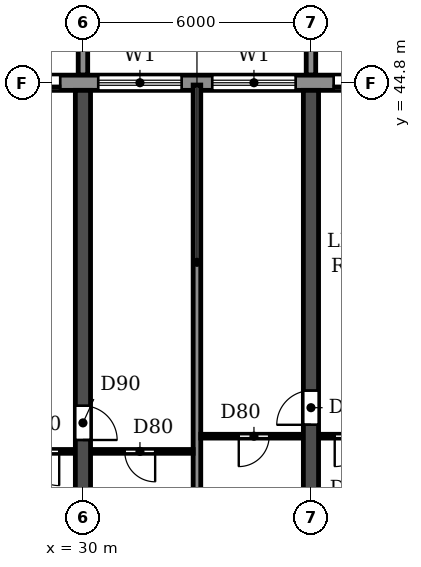
"""IFC4 building model, lengths in metres.
Left out: names, types, materials, properties, quantities, classifications, styles, units other than length and angle.
Written with IfcOpenShell. Run it as: python <this file> out.ifc"""

import sys

from ifc_helpers import new_model, si_unit, direction, frame, frame_2d, origin, place, context, subcontext, project, spatial, polyline, rectangle, outline, extrude, source, transform, mapped, element, fill, save


model = new_model("IFC4")
c1 = context("Model", 3, precision=1e-05, world=origin(), true_north=direction((0.0, 1.0)))
c2 = subcontext(c1, "Body", "Model", "MODEL_VIEW")
j1 = project(units=[si_unit("LENGTHUNIT", "METRE"), si_unit("PLANEANGLEUNIT", "RADIAN")], contexts=[c1])
p1 = place(None, origin())
s1 = spatial("IfcSite", under=j1, at=p1, CompositionType="ELEMENT")
p2 = place(p1, origin())
s2 = spatial("IfcBuilding", under=s1, at=p2, CompositionType="ELEMENT")
p3 = place(p2, frame((0.0, 0.0, 63.0)))
s3 = spatial("IfcBuildingStorey", under=s2, at=p3, CompositionType="ELEMENT", Elevation=63.0)
p4 = place(p3, frame((30.0, 30.55, 0.0), z_axis=(0.0, 0.0, 1.0), x_axis=(0.0, 1.0, 0.0)))
e1 = element("IfcWall", 1, at=p4, inside=s3, PredefinedType="SHEAR", context=c2, shape_type="SweptSolid", body=[
    extrude(rectangle(XDim=14.05, YDim=0.4, at=frame_2d((7.025, 0.0))), origin(), (0.0, 0.0, 1.0), 2.95),
])
p5 = place(p4, frame((4.85, 0.0, 0.0)))
e2 = element("IfcOpeningElement", 2, at=p5, cuts=e1, PredefinedType="OPENING", context=c2, shape_type="SweptSolid", body=[
    extrude(rectangle(XDim=0.9, YDim=2.1, at=frame_2d((0.45, 1.05))), frame((0.0, 0.21, 0.0), z_axis=(0.0, -1.0, 0.0), x_axis=(1.0, 0.0, 0.0)), (0.0, 0.0, 1.0), 0.42),
])
p6 = place(p3, frame((36.0, 30.55, 0.0), z_axis=(0.0, 0.0, 1.0), x_axis=(0.0, 1.0, 0.0)))
e3 = element("IfcWall", 3, at=p6, inside=s3, PredefinedType="SHEAR", context=c2, shape_type="SweptSolid", body=[
    extrude(rectangle(XDim=14.05, YDim=0.4, at=frame_2d((7.025, 0.0))), origin(), (0.0, 0.0, 1.0), 2.95),
])
p7 = place(p6, frame((5.25, 0.0, 0.0)))
e4 = element("IfcOpeningElement", 4, at=p7, cuts=e3, PredefinedType="OPENING", context=c2, shape_type="SweptSolid", body=[
    extrude(rectangle(XDim=0.9, YDim=2.1, at=frame_2d((0.45, 1.05))), frame((0.0, 0.21, 0.0), z_axis=(0.0, -1.0, 0.0), x_axis=(1.0, 0.0, 0.0)), (0.0, 0.0, 1.0), 0.42),
])
p8 = place(p3, frame((91.317, 44.8, 0.0), z_axis=(0.0, 0.0, 1.0), x_axis=(-1.0, 0.0, 0.0)))
e5 = element("IfcWall", 5, at=p8, inside=s3, PredefinedType="STANDARD", context=c2, shape_type="SweptSolid", body=[
    extrude(rectangle(XDim=80.634, YDim=0.4, at=frame_2d((40.317, 0.0))), origin(), (0.0, 0.0, 1.0), 2.95),
])
p9 = place(p8, frame((76.717, 0.0, 0.9)))
e6 = element("IfcOpeningElement", 6, at=p9, cuts=e5, PredefinedType="OPENING", context=c2, shape_type="SweptSolid", body=[
    extrude(rectangle(XDim=2.2, YDim=1.5, at=frame_2d((1.1, 0.75))), frame((0.0, 0.21, 0.0), z_axis=(0.0, -1.0, 0.0), x_axis=(1.0, 0.0, 0.0)), (0.0, 0.0, 1.0), 0.42),
])
p10 = place(p8, frame((73.917, 0.0, 0.0)))
e7 = element("IfcOpeningElement", 7, at=p10, cuts=e5, PredefinedType="OPENING", context=c2, shape_type="SweptSolid", body=[
    extrude(rectangle(XDim=1.8, YDim=2.4, at=frame_2d((0.9, 1.2))), frame((0.0, 0.21, 0.0), z_axis=(0.0, -1.0, 0.0), x_axis=(1.0, 0.0, 0.0)), (0.0, 0.0, 1.0), 0.42),
])
p11 = place(p8, frame((70.717, 0.0, 0.9)))
e8 = element("IfcOpeningElement", 8, at=p11, cuts=e5, PredefinedType="OPENING", context=c2, shape_type="SweptSolid", body=[
    extrude(rectangle(XDim=2.2, YDim=1.5, at=frame_2d((1.1, 0.75))), frame((0.0, 0.21, 0.0), z_axis=(0.0, -1.0, 0.0), x_axis=(1.0, 0.0, 0.0)), (0.0, 0.0, 1.0), 0.42),
])
p12 = place(p8, frame((67.917, 0.0, 0.0)))
e9 = element("IfcOpeningElement", 9, at=p12, cuts=e5, PredefinedType="OPENING", context=c2, shape_type="SweptSolid", body=[
    extrude(rectangle(XDim=1.8, YDim=2.4, at=frame_2d((0.9, 1.2))), frame((0.0, 0.21, 0.0), z_axis=(0.0, -1.0, 0.0), x_axis=(1.0, 0.0, 0.0)), (0.0, 0.0, 1.0), 0.42),
])
p13 = place(p8, frame((64.717, 0.0, 0.9)))
e10 = element("IfcOpeningElement", 10, at=p13, cuts=e5, PredefinedType="OPENING", context=c2, shape_type="SweptSolid", body=[
    extrude(rectangle(XDim=2.2, YDim=1.5, at=frame_2d((1.1, 0.75))), frame((0.0, 0.21, 0.0), z_axis=(0.0, -1.0, 0.0), x_axis=(1.0, 0.0, 0.0)), (0.0, 0.0, 1.0), 0.42),
])
p14 = place(p8, frame((61.917, 0.0, 0.0)))
e11 = element("IfcOpeningElement", 11, at=p14, cuts=e5, PredefinedType="OPENING", context=c2, shape_type="SweptSolid", body=[
    extrude(rectangle(XDim=1.8, YDim=2.4, at=frame_2d((0.9, 1.2))), frame((0.0, 0.21, 0.0), z_axis=(0.0, -1.0, 0.0), x_axis=(1.0, 0.0, 0.0)), (0.0, 0.0, 1.0), 0.42),
])
p15 = place(p8, frame((58.717, 0.0, 0.9)))
e12 = element("IfcOpeningElement", 12, at=p15, cuts=e5, PredefinedType="OPENING", context=c2, shape_type="SweptSolid", body=[
    extrude(rectangle(XDim=2.2, YDim=1.5, at=frame_2d((1.1, 0.75))), frame((0.0, 0.21, 0.0), z_axis=(0.0, -1.0, 0.0), x_axis=(1.0, 0.0, 0.0)), (0.0, 0.0, 1.0), 0.42),
])
p16 = place(p8, frame((55.717, 0.0, 0.9)))
e13 = element("IfcOpeningElement", 13, at=p16, cuts=e5, PredefinedType="OPENING", context=c2, shape_type="SweptSolid", body=[
    extrude(rectangle(XDim=2.2, YDim=1.5, at=frame_2d((1.1, 0.75))), frame((0.0, 0.21, 0.0), z_axis=(0.0, -1.0, 0.0), x_axis=(1.0, 0.0, 0.0)), (0.0, 0.0, 1.0), 0.42),
])
p17 = place(p8, frame((52.917, 0.0, 0.0)))
e14 = element("IfcOpeningElement", 14, at=p17, cuts=e5, PredefinedType="OPENING", context=c2, shape_type="SweptSolid", body=[
    extrude(rectangle(XDim=1.8, YDim=2.4, at=frame_2d((0.9, 1.2))), frame((0.0, 0.21, 0.0), z_axis=(0.0, -1.0, 0.0), x_axis=(1.0, 0.0, 0.0)), (0.0, 0.0, 1.0), 0.42),
])
p18 = place(p8, frame((49.717, 0.0, 0.9)))
e15 = element("IfcOpeningElement", 15, at=p18, cuts=e5, PredefinedType="OPENING", context=c2, shape_type="SweptSolid", body=[
    extrude(rectangle(XDim=2.2, YDim=1.5, at=frame_2d((1.1, 0.75))), frame((0.0, 0.21, 0.0), z_axis=(0.0, -1.0, 0.0), x_axis=(1.0, 0.0, 0.0)), (0.0, 0.0, 1.0), 0.42),
])
p19 = place(p8, frame((46.917, 0.0, 0.0)))
e16 = element("IfcOpeningElement", 16, at=p19, cuts=e5, PredefinedType="OPENING", context=c2, shape_type="SweptSolid", body=[
    extrude(rectangle(XDim=1.8, YDim=2.4, at=frame_2d((0.9, 1.2))), frame((0.0, 0.21, 0.0), z_axis=(0.0, -1.0, 0.0), x_axis=(1.0, 0.0, 0.0)), (0.0, 0.0, 1.0), 0.42),
])
p20 = place(p8, frame((43.717, 0.0, 0.9)))
e17 = element("IfcOpeningElement", 17, at=p20, cuts=e5, PredefinedType="OPENING", context=c2, shape_type="SweptSolid", body=[
    extrude(rectangle(XDim=2.2, YDim=1.5, at=frame_2d((1.1, 0.75))), frame((0.0, 0.21, 0.0), z_axis=(0.0, -1.0, 0.0), x_axis=(1.0, 0.0, 0.0)), (0.0, 0.0, 1.0), 0.42),
])
p21 = place(p8, frame((40.717, 0.0, 0.9)))
e18 = element("IfcOpeningElement", 18, at=p21, cuts=e5, PredefinedType="OPENING", context=c2, shape_type="SweptSolid", body=[
    extrude(rectangle(XDim=2.2, YDim=1.5, at=frame_2d((1.1, 0.75))), frame((0.0, 0.21, 0.0), z_axis=(0.0, -1.0, 0.0), x_axis=(1.0, 0.0, 0.0)), (0.0, 0.0, 1.0), 0.42),
])
p22 = place(p8, frame((37.717, 0.0, 0.9)))
e19 = element("IfcOpeningElement", 19, at=p22, cuts=e5, PredefinedType="OPENING", context=c2, shape_type="SweptSolid", body=[
    extrude(rectangle(XDim=2.2, YDim=1.5, at=frame_2d((1.1, 0.75))), frame((0.0, 0.21, 0.0), z_axis=(0.0, -1.0, 0.0), x_axis=(1.0, 0.0, 0.0)), (0.0, 0.0, 1.0), 0.42),
])
p23 = place(p8, frame((34.717, 0.0, 0.9)))
e20 = element("IfcOpeningElement", 20, at=p23, cuts=e5, PredefinedType="OPENING", context=c2, shape_type="SweptSolid", body=[
    extrude(rectangle(XDim=2.2, YDim=1.5, at=frame_2d((1.1, 0.75))), frame((0.0, 0.21, 0.0), z_axis=(0.0, -1.0, 0.0), x_axis=(1.0, 0.0, 0.0)), (0.0, 0.0, 1.0), 0.42),
])
p24 = place(p8, frame((31.917, 0.0, 0.0)))
e21 = element("IfcOpeningElement", 21, at=p24, cuts=e5, PredefinedType="OPENING", context=c2, shape_type="SweptSolid", body=[
    extrude(rectangle(XDim=1.8, YDim=2.4, at=frame_2d((0.9, 1.2))), frame((0.0, 0.21, 0.0), z_axis=(0.0, -1.0, 0.0), x_axis=(1.0, 0.0, 0.0)), (0.0, 0.0, 1.0), 0.42),
])
p25 = place(p8, frame((28.917, 0.0, 0.0)))
e22 = element("IfcOpeningElement", 22, at=p25, cuts=e5, PredefinedType="OPENING", context=c2, shape_type="SweptSolid", body=[
    extrude(rectangle(XDim=1.8, YDim=2.4, at=frame_2d((0.9, 1.2))), frame((0.0, 0.21, 0.0), z_axis=(0.0, -1.0, 0.0), x_axis=(1.0, 0.0, 0.0)), (0.0, 0.0, 1.0), 0.42),
])
p26 = place(p8, frame((25.717, 0.0, 0.9)))
e23 = element("IfcOpeningElement", 23, at=p26, cuts=e5, PredefinedType="OPENING", context=c2, shape_type="SweptSolid", body=[
    extrude(rectangle(XDim=2.2, YDim=1.5, at=frame_2d((1.1, 0.75))), frame((0.0, 0.21, 0.0), z_axis=(0.0, -1.0, 0.0), x_axis=(1.0, 0.0, 0.0)), (0.0, 0.0, 1.0), 0.42),
])
p27 = place(p8, frame((22.917, 0.0, 0.0)))
e24 = element("IfcOpeningElement", 24, at=p27, cuts=e5, PredefinedType="OPENING", context=c2, shape_type="SweptSolid", body=[
    extrude(rectangle(XDim=1.8, YDim=2.4, at=frame_2d((0.9, 1.2))), frame((0.0, 0.21, 0.0), z_axis=(0.0, -1.0, 0.0), x_axis=(1.0, 0.0, 0.0)), (0.0, 0.0, 1.0), 0.42),
])
p28 = place(p8, frame((19.717, 0.0, 0.9)))
e25 = element("IfcOpeningElement", 25, at=p28, cuts=e5, PredefinedType="OPENING", context=c2, shape_type="SweptSolid", body=[
    extrude(rectangle(XDim=2.2, YDim=1.5, at=frame_2d((1.1, 0.75))), frame((0.0, 0.21, 0.0), z_axis=(0.0, -1.0, 0.0), x_axis=(1.0, 0.0, 0.0)), (0.0, 0.0, 1.0), 0.42),
])
p29 = place(p8, frame((16.917, 0.0, 0.0)))
e26 = element("IfcOpeningElement", 26, at=p29, cuts=e5, PredefinedType="OPENING", context=c2, shape_type="SweptSolid", body=[
    extrude(rectangle(XDim=1.8, YDim=2.4, at=frame_2d((0.9, 1.2))), frame((0.0, 0.21, 0.0), z_axis=(0.0, -1.0, 0.0), x_axis=(1.0, 0.0, 0.0)), (0.0, 0.0, 1.0), 0.42),
])
p30 = place(p8, frame((13.717, 0.0, 0.9)))
e27 = element("IfcOpeningElement", 27, at=p30, cuts=e5, PredefinedType="OPENING", context=c2, shape_type="SweptSolid", body=[
    extrude(rectangle(XDim=2.2, YDim=1.5, at=frame_2d((1.1, 0.75))), frame((0.0, 0.21, 0.0), z_axis=(0.0, -1.0, 0.0), x_axis=(1.0, 0.0, 0.0)), (0.0, 0.0, 1.0), 0.42),
])
p31 = place(p8, frame((10.917, 0.0, 0.0)))
e28 = element("IfcOpeningElement", 28, at=p31, cuts=e5, PredefinedType="OPENING", context=c2, shape_type="SweptSolid", body=[
    extrude(rectangle(XDim=1.8, YDim=2.4, at=frame_2d((0.9, 1.2))), frame((0.0, 0.21, 0.0), z_axis=(0.0, -1.0, 0.0), x_axis=(1.0, 0.0, 0.0)), (0.0, 0.0, 1.0), 0.42),
])
p32 = place(p8, frame((7.717, 0.0, 0.9)))
e29 = element("IfcOpeningElement", 29, at=p32, cuts=e5, PredefinedType="OPENING", context=c2, shape_type="SweptSolid", body=[
    extrude(rectangle(XDim=2.2, YDim=1.5, at=frame_2d((1.1, 0.75))), frame((0.0, 0.21, 0.0), z_axis=(0.0, -1.0, 0.0), x_axis=(1.0, 0.0, 0.0)), (0.0, 0.0, 1.0), 0.42),
])
p33 = place(p8, frame((4.717, 0.0, 0.9)))
e30 = element("IfcOpeningElement", 30, at=p33, cuts=e5, PredefinedType="OPENING", context=c2, shape_type="SweptSolid", body=[
    extrude(rectangle(XDim=2.2, YDim=1.5, at=frame_2d((1.1, 0.75))), frame((0.0, 0.21, 0.0), z_axis=(0.0, -1.0, 0.0), x_axis=(1.0, 0.0, 0.0)), (0.0, 0.0, 1.0), 0.42),
])
p34 = place(p8, frame((1.717, 0.0, 0.9)))
e31 = element("IfcOpeningElement", 31, at=p34, cuts=e5, PredefinedType="OPENING", context=c2, shape_type="SweptSolid", body=[
    extrude(rectangle(XDim=2.2, YDim=1.5, at=frame_2d((1.1, 0.75))), frame((0.0, 0.21, 0.0), z_axis=(0.0, -1.0, 0.0), x_axis=(1.0, 0.0, 0.0)), (0.0, 0.0, 1.0), 0.42),
])
m1 = source(origin(), c2, "Body", "SweptSolid", [
    extrude(outline(polyline([(0.0, 0.0), (0.25, 0.0), (0.25, 3.1), (0.0, 3.1), (0.0, 0.0)])), origin(), (0.0, 0.0, 1.0), 3.1),
])
for number, where in (
    (32, (29.875, 45.0, 0.0)),
    (33, (35.875, 45.0, 0.0)),
):
    element("IfcWall", number, at=place(p3, frame(where)), inside=s3, PredefinedType="STANDARD", context=c2, shape_type="MappedRepresentation", body=[
        mapped(m1, transform((0.0, 0.0, 0.0))),
    ])
p35 = place(p3, frame((33.0, 30.56, 0.0), z_axis=(0.0, 0.0, 1.0), x_axis=(0.0, 1.0, 0.0)))
e34 = element("IfcWall", 34, at=p35, inside=s3, PredefinedType="PARTITIONING", context=c2, shape_type="SweptSolid", body=[
    extrude(rectangle(XDim=14.18, YDim=0.2, at=frame_2d((7.09, 0.0))), origin(), (0.0, 0.0, 1.0), 2.95),
])
p36 = place(p3, frame((27.8, 35.1, 0.0), z_axis=(0.0, 0.0, 1.0), x_axis=(1.0, 0.0, 0.0)))
e35 = element("IfcWall", 35, at=p36, inside=s3, PredefinedType="PARTITIONING", context=c2, shape_type="SweptSolid", body=[
    extrude(rectangle(XDim=1.99, YDim=0.1, at=frame_2d((0.995, 0.0))), origin(), (0.0, 0.0, 1.0), 2.95),
])
p37 = place(p36, frame((0.675, 0.0, 0.0)))
e36 = element("IfcOpeningElement", 36, at=p37, cuts=e35, PredefinedType="OPENING", context=c2, shape_type="SweptSolid", body=[
    extrude(rectangle(XDim=0.9, YDim=2.1, at=frame_2d((0.45, 1.05))), frame((0.0, 0.06, 0.0), z_axis=(0.0, -1.0, 0.0), x_axis=(1.0, 0.0, 0.0)), (0.0, 0.0, 1.0), 0.12),
])
p38 = place(p3, frame((30.21, 35.1, 0.0), z_axis=(0.0, 0.0, 1.0), x_axis=(1.0, 0.0, 0.0)))
e37 = element("IfcWall", 37, at=p38, inside=s3, PredefinedType="PARTITIONING", context=c2, shape_type="SweptSolid", body=[
    extrude(rectangle(XDim=2.69, YDim=0.1, at=frame_2d((1.345, 0.0))), origin(), (0.0, 0.0, 1.0), 2.95),
])
p39 = place(p38, frame((0.89, 0.0, 0.0)))
e38 = element("IfcOpeningElement", 38, at=p39, cuts=e37, PredefinedType="OPENING", context=c2, shape_type="SweptSolid", body=[
    extrude(rectangle(XDim=0.8, YDim=2.1, at=frame_2d((0.4, 1.05))), frame((0.0, 0.06, 0.0), z_axis=(0.0, -1.0, 0.0), x_axis=(1.0, 0.0, 0.0)), (0.0, 0.0, 1.0), 0.12),
])
p40 = place(p3, frame((33.1, 35.5, 0.0), z_axis=(0.0, 0.0, 1.0), x_axis=(1.0, 0.0, 0.0)))
e39 = element("IfcWall", 39, at=p40, inside=s3, PredefinedType="PARTITIONING", context=c2, shape_type="SweptSolid", body=[
    extrude(rectangle(XDim=2.69, YDim=0.1, at=frame_2d((1.345, 0.0))), origin(), (0.0, 0.0, 1.0), 2.95),
])
p41 = place(p40, frame((1.0, 0.0, 0.0)))
e40 = element("IfcOpeningElement", 40, at=p41, cuts=e39, PredefinedType="OPENING", context=c2, shape_type="SweptSolid", body=[
    extrude(rectangle(XDim=0.8, YDim=2.1, at=frame_2d((0.4, 1.05))), frame((0.0, 0.06, 0.0), z_axis=(0.0, -1.0, 0.0), x_axis=(1.0, 0.0, 0.0)), (0.0, 0.0, 1.0), 0.12),
])
p42 = place(p3, frame((36.21, 35.5, 0.0), z_axis=(0.0, 0.0, 1.0), x_axis=(1.0, 0.0, 0.0)))
e41 = element("IfcWall", 41, at=p42, inside=s3, PredefinedType="PARTITIONING", context=c2, shape_type="SweptSolid", body=[
    extrude(rectangle(XDim=1.89, YDim=0.1, at=frame_2d((0.945, 0.0))), origin(), (0.0, 0.0, 1.0), 2.95),
])
p43 = place(p42, frame((0.415, 0.0, 0.0)))
e42 = element("IfcOpeningElement", 42, at=p43, cuts=e41, PredefinedType="OPENING", context=c2, shape_type="SweptSolid", body=[
    extrude(rectangle(XDim=0.8, YDim=2.1, at=frame_2d((0.4, 1.05))), frame((0.0, 0.06, 0.0), z_axis=(0.0, -1.0, 0.0), x_axis=(1.0, 0.0, 0.0)), (0.0, 0.0, 1.0), 0.12),
])
p44 = place(p14, origin())
e43 = element("IfcDoor", 43, at=p44, inside=s3, OperationType="DOUBLE_DOOR_SLIDING", PredefinedType="DOOR", context=c2, shape_type="SweptSolid", body=[
    extrude(rectangle(XDim=1.8, YDim=2.4, at=frame_2d((0.9, 1.2))), frame((0.0, 0.025, 0.0), z_axis=(0.0, -1.0, 0.0), x_axis=(1.0, 0.0, 0.0)), (0.0, 0.0, 1.0), 0.05),
])
fill(e11, e43)
p45 = place(p15, origin())
e44 = element("IfcWindow", 44, at=p45, inside=s3, PartitioningType="DOUBLE_PANEL_HORIZONTAL", PredefinedType="WINDOW", context=c2, shape_type="SweptSolid", body=[
    extrude(rectangle(XDim=2.2, YDim=1.5, at=frame_2d((1.1, 0.75))), frame((0.0, 0.03, 0.0), z_axis=(0.0, -1.0, 0.0), x_axis=(1.0, 0.0, 0.0)), (0.0, 0.0, 1.0), 0.06),
])
fill(e12, e44)
p46 = place(p16, origin())
e45 = element("IfcWindow", 45, at=p46, inside=s3, PartitioningType="DOUBLE_PANEL_HORIZONTAL", PredefinedType="WINDOW", context=c2, shape_type="SweptSolid", body=[
    extrude(rectangle(XDim=2.2, YDim=1.5, at=frame_2d((1.1, 0.75))), frame((0.0, 0.03, 0.0), z_axis=(0.0, -1.0, 0.0), x_axis=(1.0, 0.0, 0.0)), (0.0, 0.0, 1.0), 0.06),
])
fill(e13, e45)
p47 = place(p17, origin())
e46 = element("IfcDoor", 46, at=p47, inside=s3, OperationType="DOUBLE_DOOR_SLIDING", PredefinedType="DOOR", context=c2, shape_type="SweptSolid", body=[
    extrude(rectangle(XDim=1.8, YDim=2.4, at=frame_2d((0.9, 1.2))), frame((0.0, 0.025, 0.0), z_axis=(0.0, -1.0, 0.0), x_axis=(1.0, 0.0, 0.0)), (0.0, 0.0, 1.0), 0.05),
])
fill(e14, e46)
p48 = place(p39, frame((0.8, 0.0, 0.0), z_axis=(0.0, 0.0, 1.0), x_axis=(-1.0, 0.0, 0.0)))
e47 = element("IfcDoor", 47, at=p48, inside=s3, OperationType="SINGLE_SWING_LEFT", PredefinedType="DOOR", context=c2, shape_type="SweptSolid", body=[
    extrude(rectangle(XDim=0.8, YDim=2.1, at=frame_2d((0.4, 1.05))), frame((0.0, 0.025, 0.0), z_axis=(0.0, -1.0, 0.0), x_axis=(1.0, 0.0, 0.0)), (0.0, 0.0, 1.0), 0.05),
])
fill(e38, e47)
p49 = place(p37, frame((0.9, 0.0, 0.0), z_axis=(0.0, 0.0, 1.0), x_axis=(-1.0, 0.0, 0.0)))
e48 = element("IfcDoor", 48, at=p49, inside=s3, OperationType="SINGLE_SWING_LEFT", PredefinedType="DOOR", context=c2, shape_type="SweptSolid", body=[
    extrude(rectangle(XDim=0.9, YDim=2.1, at=frame_2d((0.45, 1.05))), frame((0.0, 0.025, 0.0), z_axis=(0.0, -1.0, 0.0), x_axis=(1.0, 0.0, 0.0)), (0.0, 0.0, 1.0), 0.05),
])
fill(e36, e48)
p50 = place(p5, frame((0.9, 0.0, 0.0), z_axis=(0.0, 0.0, 1.0), x_axis=(-1.0, 0.0, 0.0)))
e49 = element("IfcDoor", 49, at=p50, inside=s3, OperationType="SINGLE_SWING_RIGHT", PredefinedType="DOOR", context=c2, shape_type="SweptSolid", body=[
    extrude(rectangle(XDim=0.9, YDim=2.1, at=frame_2d((0.45, 1.05))), frame((0.0, 0.025, 0.0), z_axis=(0.0, -1.0, 0.0), x_axis=(1.0, 0.0, 0.0)), (0.0, 0.0, 1.0), 0.05),
])
fill(e2, e49)
p51 = place(p41, frame((0.8, 0.0, 0.0), z_axis=(0.0, 0.0, 1.0), x_axis=(-1.0, 0.0, 0.0)))
e50 = element("IfcDoor", 50, at=p51, inside=s3, OperationType="SINGLE_SWING_RIGHT", PredefinedType="DOOR", context=c2, shape_type="SweptSolid", body=[
    extrude(rectangle(XDim=0.8, YDim=2.1, at=frame_2d((0.4, 1.05))), frame((0.0, 0.025, 0.0), z_axis=(0.0, -1.0, 0.0), x_axis=(1.0, 0.0, 0.0)), (0.0, 0.0, 1.0), 0.05),
])
fill(e40, e50)
p52 = place(p7, origin())
e51 = element("IfcDoor", 51, at=p52, inside=s3, OperationType="SINGLE_SWING_LEFT", PredefinedType="DOOR", context=c2, shape_type="SweptSolid", body=[
    extrude(rectangle(XDim=0.9, YDim=2.1, at=frame_2d((0.45, 1.05))), frame((0.0, 0.025, 0.0), z_axis=(0.0, -1.0, 0.0), x_axis=(1.0, 0.0, 0.0)), (0.0, 0.0, 1.0), 0.05),
])
fill(e4, e51)
p53 = place(p43, frame((0.8, 0.0, 0.0), z_axis=(0.0, 0.0, 1.0), x_axis=(-1.0, 0.0, 0.0)))
e52 = element("IfcDoor", 52, at=p53, inside=s3, OperationType="SINGLE_SWING_RIGHT", PredefinedType="DOOR", context=c2, shape_type="SweptSolid", body=[
    extrude(rectangle(XDim=0.8, YDim=2.1, at=frame_2d((0.4, 1.05))), frame((0.0, 0.025, 0.0), z_axis=(0.0, -1.0, 0.0), x_axis=(1.0, 0.0, 0.0)), (0.0, 0.0, 1.0), 0.05),
])
fill(e42, e52)
save(model, sys.argv[1])
